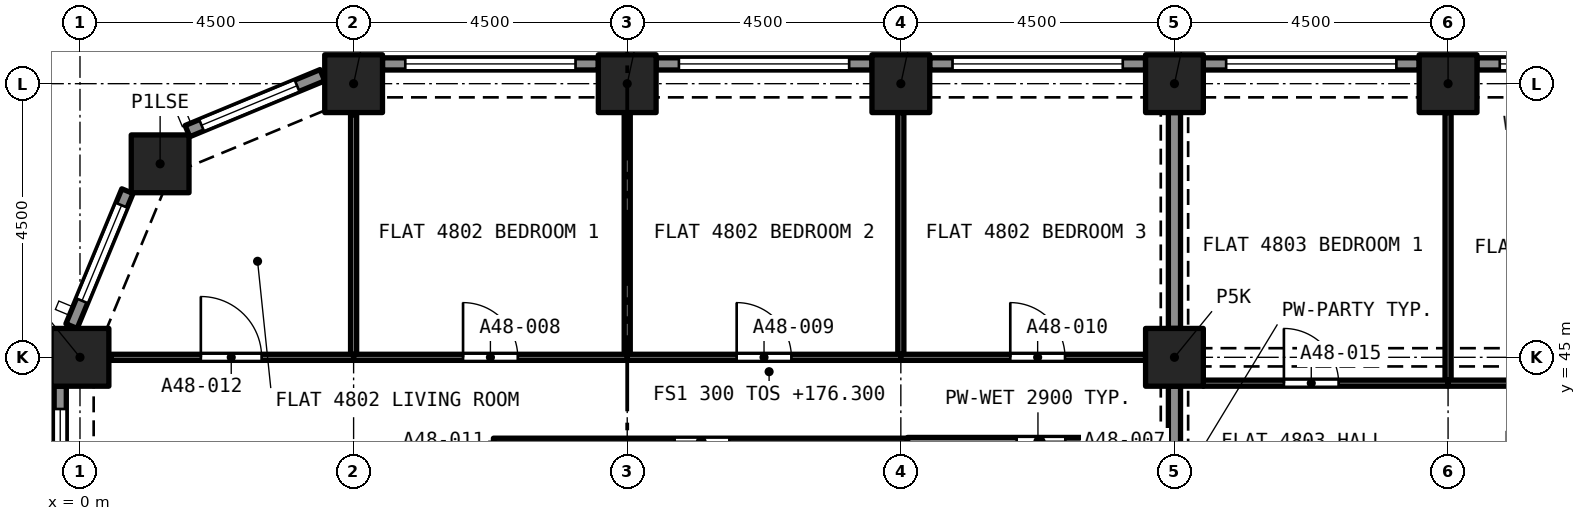
"""IFC4 building model, lengths in metres.
Left out: names, types, materials, properties, quantities, classifications, styles, units other than length and angle.
Written with IfcOpenShell. Run it as: python <this file> out.ifc"""

import sys

from ifc_helpers import new_model, si_unit, direction, frame, frame_2d, origin, origin_2d, place, context, subcontext, project, spatial, rectangle, extrude, element, fill, save


model = new_model("IFC4")
c1 = context("Model", 3, precision=1e-05, world=origin(), true_north=direction((0.0, 1.0)))
c2 = subcontext(c1, "Body", "Model", "MODEL_VIEW")
j1 = project(units=[si_unit("LENGTHUNIT", "METRE"), si_unit("PLANEANGLEUNIT", "RADIAN")], contexts=[c1])
p1 = place(None, origin())
s1 = spatial("IfcSite", under=j1, at=p1, CompositionType="ELEMENT")
p2 = place(p1, origin())
s2 = spatial("IfcBuilding", under=s1, at=p2, CompositionType="ELEMENT")
p3 = place(p2, frame((0.0, 0.0, 176.3)))
s3 = spatial("IfcBuildingStorey", under=s2, at=p3, CompositionType="ELEMENT", Elevation=176.3)
for number, where, z_axis, x_axis in (
    (1, (0.0, 45.0, 0.0), (0.0, 0.0, 1.0), (1.0, 0.0, 0.0)),
    (2, (18.0, 45.0, 0.0), (0.0, 0.0, 1.0), (1.0, 0.0, 0.0)),
    (3, (1.318, 48.182, 0.0), (0.0, 0.0, 1.0), (1.0, 0.0, 0.0)),
    (4, (4.5, 49.5, 0.0), (0.0, 0.0, 1.0), (1.0, 0.0, 0.0)),
    (5, (9.0, 49.5, 0.0), (0.0, 0.0, 1.0), (1.0, 0.0, 0.0)),
    (6, (13.5, 49.5, 0.0), (0.0, 0.0, 1.0), (1.0, 0.0, 0.0)),
    (7, (18.0, 49.5, 0.0), (0.0, 0.0, 1.0), (1.0, 0.0, 0.0)),
):
    element("IfcColumn", number, at=place(p3, frame(where, z_axis=z_axis, x_axis=x_axis)), inside=s3, PredefinedType="COLUMN", context=c2, shape_type="SweptSolid", body=[
        extrude(rectangle(XDim=0.95, YDim=0.95, at=origin_2d()), origin(), (0.0, 0.0, 1.0), 3.2),
    ])
p4 = place(p3, frame((22.5, 49.5, -0.45), z_axis=(0.0, 0.0, 1.0), x_axis=(1.0, 0.0, 0.0)))
e8 = element("IfcColumn", 8, at=p4, inside=s3, PredefinedType="COLUMN", context=c2, shape_type="SweptSolid", body=[
    extrude(rectangle(XDim=0.95, YDim=0.95, at=origin_2d()), origin(), (0.0, 0.0, 1.0), 3.65),
])
p5 = place(p3, frame((22.975, 49.825, 0.0), z_axis=(0.0, 0.0, 1.0), x_axis=(1.0, 0.0, 0.0)))
e9 = element("IfcWall", 9, at=p5, inside=s3, PredefinedType="SOLIDWALL", context=c2, shape_type="SweptSolid", body=[
    extrude(rectangle(XDim=3.55, YDim=0.2, at=frame_2d((1.775, 0.0))), origin(), (0.0, 0.0, 1.0), 3.2),
])
p6 = place(p5, frame((0.375, 0.0, 0.45)))
e10 = element("IfcOpeningElement", 10, at=p6, cuts=e9, PredefinedType="OPENING", context=c2, shape_type="SweptSolid", body=[
    extrude(rectangle(XDim=2.8, YDim=1.95, at=frame_2d((1.4, 0.975))), frame((0.0, 0.11, 0.0), z_axis=(0.0, -1.0, 0.0), x_axis=(1.0, 0.0, 0.0)), (0.0, 0.0, 1.0), 0.22),
])
p7 = place(p3, frame((18.475, 49.825, 0.0), z_axis=(0.0, 0.0, 1.0), x_axis=(1.0, 0.0, 0.0)))
e11 = element("IfcWall", 11, at=p7, inside=s3, PredefinedType="SOLIDWALL", context=c2, shape_type="SweptSolid", body=[
    extrude(rectangle(XDim=3.55, YDim=0.2, at=frame_2d((1.775, 0.0))), origin(), (0.0, 0.0, 1.0), 3.2),
])
p8 = place(p7, frame((0.375, 0.0, 0.45)))
e12 = element("IfcOpeningElement", 12, at=p8, cuts=e11, PredefinedType="OPENING", context=c2, shape_type="SweptSolid", body=[
    extrude(rectangle(XDim=2.8, YDim=1.95, at=frame_2d((1.4, 0.975))), frame((0.0, 0.11, 0.0), z_axis=(0.0, -1.0, 0.0), x_axis=(1.0, 0.0, 0.0)), (0.0, 0.0, 1.0), 0.22),
])
p9 = place(p3, frame((13.975, 49.825, 0.0), z_axis=(0.0, 0.0, 1.0), x_axis=(1.0, 0.0, 0.0)))
e13 = element("IfcWall", 13, at=p9, inside=s3, PredefinedType="SOLIDWALL", context=c2, shape_type="SweptSolid", body=[
    extrude(rectangle(XDim=3.55, YDim=0.2, at=frame_2d((1.775, 0.0))), origin(), (0.0, 0.0, 1.0), 3.2),
])
p10 = place(p9, frame((0.375, 0.0, 0.45)))
e14 = element("IfcOpeningElement", 14, at=p10, cuts=e13, PredefinedType="OPENING", context=c2, shape_type="SweptSolid", body=[
    extrude(rectangle(XDim=2.8, YDim=1.95, at=frame_2d((1.4, 0.975))), frame((0.0, 0.11, 0.0), z_axis=(0.0, -1.0, 0.0), x_axis=(1.0, 0.0, 0.0)), (0.0, 0.0, 1.0), 0.22),
])
p11 = place(p3, frame((9.475, 49.825, 0.0), z_axis=(0.0, 0.0, 1.0), x_axis=(1.0, 0.0, 0.0)))
e15 = element("IfcWall", 15, at=p11, inside=s3, PredefinedType="SOLIDWALL", context=c2, shape_type="SweptSolid", body=[
    extrude(rectangle(XDim=3.55, YDim=0.2, at=frame_2d((1.775, 0.0))), origin(), (0.0, 0.0, 1.0), 3.2),
])
p12 = place(p11, frame((0.375, 0.0, 0.45)))
e16 = element("IfcOpeningElement", 16, at=p12, cuts=e15, PredefinedType="OPENING", context=c2, shape_type="SweptSolid", body=[
    extrude(rectangle(XDim=2.8, YDim=1.95, at=frame_2d((1.4, 0.975))), frame((0.0, 0.11, 0.0), z_axis=(0.0, -1.0, 0.0), x_axis=(1.0, 0.0, 0.0)), (0.0, 0.0, 1.0), 0.22),
])
p13 = place(p3, frame((4.975, 49.825, 0.0), z_axis=(0.0, 0.0, 1.0), x_axis=(1.0, 0.0, 0.0)))
e17 = element("IfcWall", 17, at=p13, inside=s3, PredefinedType="SOLIDWALL", context=c2, shape_type="SweptSolid", body=[
    extrude(rectangle(XDim=3.55, YDim=0.2, at=frame_2d((1.775, 0.0))), origin(), (0.0, 0.0, 1.0), 3.2),
])
p14 = place(p13, frame((0.375, 0.0, 0.45)))
e18 = element("IfcOpeningElement", 18, at=p14, cuts=e17, PredefinedType="OPENING", context=c2, shape_type="SweptSolid", body=[
    extrude(rectangle(XDim=2.8, YDim=1.95, at=frame_2d((1.4, 0.975))), frame((0.0, 0.11, 0.0), z_axis=(0.0, -1.0, 0.0), x_axis=(1.0, 0.0, 0.0)), (0.0, 0.0, 1.0), 0.22),
])
p15 = place(p3, frame((1.767, 48.72, 0.0), z_axis=(0.0, 0.0, 1.0), x_axis=(0.923880599843, 0.382680855588, 0.0)))
e19 = element("IfcWall", 19, at=p15, inside=s3, PredefinedType="SOLIDWALL", context=c2, shape_type="SweptSolid", body=[
    extrude(rectangle(XDim=2.403, YDim=0.2, at=frame_2d((1.201, 0.0))), origin(), (0.0, 0.0, 1.0), 3.2),
])
p16 = place(p15, frame((0.251, 0.0, 0.45)))
e20 = element("IfcOpeningElement", 20, at=p16, cuts=e19, PredefinedType="OPENING", context=c2, shape_type="SweptSolid", body=[
    extrude(rectangle(XDim=1.7, YDim=1.95, at=frame_2d((0.85, 0.975))), frame((0.0, 0.11, 0.0), z_axis=(0.0, -1.0, 0.0), x_axis=(1.0, 0.0, 0.0)), (0.0, 0.0, 1.0), 0.22),
])
p17 = place(p3, frame((-0.139, 45.513, 0.0), z_axis=(0.0, 0.0, 1.0), x_axis=(0.382680855588, 0.923880599843, 0.0)))
e21 = element("IfcWall", 21, at=p17, inside=s3, PredefinedType="SOLIDWALL", context=c2, shape_type="SweptSolid", body=[
    extrude(rectangle(XDim=2.403, YDim=0.2, at=frame_2d((1.201, 0.0))), origin(), (0.0, 0.0, 1.0), 3.2),
])
p18 = place(p17, frame((0.451, 0.0, 0.45)))
e22 = element("IfcOpeningElement", 22, at=p18, cuts=e21, PredefinedType="OPENING", context=c2, shape_type="SweptSolid", body=[
    extrude(rectangle(XDim=1.7, YDim=1.95, at=frame_2d((0.85, 0.975))), frame((0.0, 0.11, 0.0), z_axis=(0.0, -1.0, 0.0), x_axis=(1.0, 0.0, 0.0)), (0.0, 0.0, 1.0), 0.22),
])
p19 = place(p3, frame((-0.325, 40.975, 0.0), z_axis=(0.0, 0.0, 1.0), x_axis=(0.0, 1.0, 0.0)))
e23 = element("IfcWall", 23, at=p19, inside=s3, PredefinedType="SOLIDWALL", context=c2, shape_type="SweptSolid", body=[
    extrude(rectangle(XDim=3.55, YDim=0.2, at=frame_2d((1.775, 0.0))), origin(), (0.0, 0.0, 1.0), 3.2),
])
p20 = place(p19, frame((0.375, 0.0, 0.45)))
e24 = element("IfcOpeningElement", 24, at=p20, cuts=e23, PredefinedType="OPENING", context=c2, shape_type="SweptSolid", body=[
    extrude(rectangle(XDim=2.8, YDim=1.95, at=frame_2d((1.4, 0.975))), frame((0.0, 0.11, 0.0), z_axis=(0.0, -1.0, 0.0), x_axis=(1.0, 0.0, 0.0)), (0.0, 0.0, 1.0), 0.22),
])
p21 = place(p3, frame((17.9, 43.62, 0.0), z_axis=(0.0, 0.0, 1.0), x_axis=(-1.0, 0.0, 0.0)))
e25 = element("IfcWall", 25, at=p21, inside=s3, PredefinedType="PARTITIONING", context=c2, shape_type="SweptSolid", body=[
    extrude(rectangle(XDim=4.29, YDim=0.125, at=frame_2d((2.145, 0.0))), origin(), (0.0, 0.0, 1.0), 2.9),
])
p22 = place(p21, frame((1.695, 0.0, 0.0)))
e26 = element("IfcOpeningElement", 26, at=p22, cuts=e25, PredefinedType="OPENING", context=c2, shape_type="SweptSolid", body=[
    extrude(rectangle(XDim=0.8, YDim=2.1, at=frame_2d((0.4, 1.05))), frame((0.0, 0.073, 0.0), z_axis=(0.0, -1.0, 0.0), x_axis=(1.0, 0.0, 0.0)), (0.0, 0.0, 1.0), 0.145),
])
p23 = place(p3, frame((18.0, 40.975, 0.0), z_axis=(0.0, 0.0, 1.0), x_axis=(0.0, 1.0, 0.0)))
e27 = element("IfcWall", 27, at=p23, inside=s3, PredefinedType="PARTITIONING", context=c2, shape_type="SweptSolid", body=[
    extrude(rectangle(XDim=3.55, YDim=0.2, at=frame_2d((1.775, 0.0))), origin(), (0.0, 0.0, 1.0), 2.38),
])
p24 = place(p3, frame((9.0, 45.05, 0.0), z_axis=(0.0, 0.0, 1.0), x_axis=(0.0, 1.0, 0.0)))
e28 = element("IfcWall", 28, at=p24, inside=s3, PredefinedType="PARTITIONING", context=c2, shape_type="SweptSolid", body=[
    extrude(rectangle(XDim=3.975, YDim=0.1, at=frame_2d((1.987, 0.0))), origin(), (0.0, 0.0, 1.0), 2.9),
])
p25 = place(p3, frame((4.5, 45.0, 0.0), z_axis=(0.0, 0.0, 1.0), x_axis=(1.0, 0.0, 0.0)))
e29 = element("IfcWall", 29, at=p25, inside=s3, PredefinedType="PARTITIONING", context=c2, shape_type="SweptSolid", body=[
    extrude(rectangle(XDim=4.5, YDim=0.1, at=frame_2d((2.25, 0.0))), origin(), (0.0, 0.0, 1.0), 2.9),
])
p26 = place(p25, frame((1.8, 0.0, 0.0)))
e30 = element("IfcOpeningElement", 30, at=p26, cuts=e29, PredefinedType="OPENING", context=c2, shape_type="SweptSolid", body=[
    extrude(rectangle(XDim=0.9, YDim=2.1, at=frame_2d((0.45, 1.05))), frame((0.0, 0.06, 0.0), z_axis=(0.0, -1.0, 0.0), x_axis=(1.0, 0.0, 0.0)), (0.0, 0.0, 1.0), 0.12),
])
p27 = place(p3, frame((4.5, 45.05, 0.0), z_axis=(0.0, 0.0, 1.0), x_axis=(0.0, 1.0, 0.0)))
e31 = element("IfcWall", 31, at=p27, inside=s3, PredefinedType="PARTITIONING", context=c2, shape_type="SweptSolid", body=[
    extrude(rectangle(XDim=3.936, YDim=0.1, at=frame_2d((1.968, 0.0))), origin(), (0.0, 0.0, 1.0), 2.9),
])
p28 = place(p3, frame((13.5, 45.05, 0.0), z_axis=(0.0, 0.0, 1.0), x_axis=(0.0, 1.0, 0.0)))
e32 = element("IfcWall", 32, at=p28, inside=s3, PredefinedType="PARTITIONING", context=c2, shape_type="SweptSolid", body=[
    extrude(rectangle(XDim=3.975, YDim=0.1, at=frame_2d((1.987, 0.0))), origin(), (0.0, 0.0, 1.0), 2.9),
])
p29 = place(p3, frame((9.0, 45.0, 0.0), z_axis=(0.0, 0.0, 1.0), x_axis=(1.0, 0.0, 0.0)))
e33 = element("IfcWall", 33, at=p29, inside=s3, PredefinedType="PARTITIONING", context=c2, shape_type="SweptSolid", body=[
    extrude(rectangle(XDim=4.5, YDim=0.1, at=frame_2d((2.25, 0.0))), origin(), (0.0, 0.0, 1.0), 2.9),
])
p30 = place(p29, frame((1.8, 0.0, 0.0)))
e34 = element("IfcOpeningElement", 34, at=p30, cuts=e33, PredefinedType="OPENING", context=c2, shape_type="SweptSolid", body=[
    extrude(rectangle(XDim=0.9, YDim=2.1, at=frame_2d((0.45, 1.05))), frame((0.0, 0.06, 0.0), z_axis=(0.0, -1.0, 0.0), x_axis=(1.0, 0.0, 0.0)), (0.0, 0.0, 1.0), 0.12),
])
p31 = place(p3, frame((13.5, 45.0, 0.0), z_axis=(0.0, 0.0, 1.0), x_axis=(1.0, 0.0, 0.0)))
e35 = element("IfcWall", 35, at=p31, inside=s3, PredefinedType="PARTITIONING", context=c2, shape_type="SweptSolid", body=[
    extrude(rectangle(XDim=4.025, YDim=0.1, at=frame_2d((2.012, 0.0))), origin(), (0.0, 0.0, 1.0), 2.9),
])
p32 = place(p31, frame((1.8, 0.0, 0.0)))
e36 = element("IfcOpeningElement", 36, at=p32, cuts=e35, PredefinedType="OPENING", context=c2, shape_type="SweptSolid", body=[
    extrude(rectangle(XDim=0.9, YDim=2.1, at=frame_2d((0.45, 1.05))), frame((0.0, 0.06, 0.0), z_axis=(0.0, -1.0, 0.0), x_axis=(1.0, 0.0, 0.0)), (0.0, 0.0, 1.0), 0.12),
])
p33 = place(p3, frame((18.0, 45.475, 0.0), z_axis=(0.0, 0.0, 1.0), x_axis=(0.0, 1.0, 0.0)))
e37 = element("IfcWall", 37, at=p33, inside=s3, PredefinedType="PARTITIONING", context=c2, shape_type="SweptSolid", body=[
    extrude(rectangle(XDim=3.55, YDim=0.2, at=frame_2d((1.775, 0.0))), origin(), (0.0, 0.0, 1.0), 2.38),
])
p34 = place(p3, frame((13.61, 43.62, 0.0), z_axis=(0.0, 0.0, 1.0), x_axis=(-1.0, 0.0, 0.0)))
e38 = element("IfcWall", 38, at=p34, inside=s3, PredefinedType="PARTITIONING", context=c2, shape_type="SweptSolid", body=[
    extrude(rectangle(XDim=6.81, YDim=0.1, at=frame_2d((3.405, 0.0))), origin(), (0.0, 0.0, 1.0), 2.9),
])
p35 = place(p34, frame((2.93, 0.0, 0.0)))
e39 = element("IfcOpeningElement", 39, at=p35, cuts=e38, PredefinedType="OPENING", context=c2, shape_type="SweptSolid", body=[
    extrude(rectangle(XDim=0.9, YDim=2.1, at=frame_2d((0.45, 1.05))), frame((0.0, 0.06, 0.0), z_axis=(0.0, -1.0, 0.0), x_axis=(1.0, 0.0, 0.0)), (0.0, 0.0, 1.0), 0.12),
])
p36 = place(p3, frame((0.514, 45.0, 0.0), z_axis=(0.0, 0.0, 1.0), x_axis=(1.0, 0.0, 0.0)))
e40 = element("IfcWall", 40, at=p36, inside=s3, PredefinedType="PARTITIONING", context=c2, shape_type="SweptSolid", body=[
    extrude(rectangle(XDim=3.986, YDim=0.1, at=frame_2d((1.993, 0.0))), origin(), (0.0, 0.0, 1.0), 2.9),
])
p37 = place(p36, frame((1.473, 0.0, 0.0)))
e41 = element("IfcOpeningElement", 41, at=p37, cuts=e40, PredefinedType="OPENING", context=c2, shape_type="SweptSolid", body=[
    extrude(rectangle(XDim=1.0, YDim=2.1, at=frame_2d((0.5, 1.05))), frame((0.0, 0.06, 0.0), z_axis=(0.0, -1.0, 0.0), x_axis=(1.0, 0.0, 0.0)), (0.0, 0.0, 1.0), 0.12),
])
p38 = place(p3, frame((22.5, 44.625, 0.0), z_axis=(0.0, 0.0, 1.0), x_axis=(0.0, 1.0, 0.0)))
e42 = element("IfcWall", 42, at=p38, inside=s3, PredefinedType="PARTITIONING", context=c2, shape_type="SweptSolid", body=[
    extrude(rectangle(XDim=4.4, YDim=0.1, at=frame_2d((2.2, 0.0))), origin(), (0.0, 0.0, 1.0), 2.75),
])
p39 = place(p3, frame((18.475, 44.575, 0.0), z_axis=(0.0, 0.0, 1.0), x_axis=(1.0, 0.0, 0.0)))
e43 = element("IfcWall", 43, at=p39, inside=s3, PredefinedType="PARTITIONING", context=c2, shape_type="SweptSolid", body=[
    extrude(rectangle(XDim=4.025, YDim=0.1, at=frame_2d((2.012, 0.0))), origin(), (0.0, 0.0, 1.0), 2.75),
])
p40 = place(p39, frame((1.325, 0.0, 0.0)))
e44 = element("IfcOpeningElement", 44, at=p40, cuts=e43, PredefinedType="OPENING", context=c2, shape_type="SweptSolid", body=[
    extrude(rectangle(XDim=0.9, YDim=2.1, at=frame_2d((0.45, 1.05))), frame((0.0, 0.06, 0.0), z_axis=(0.0, -1.0, 0.0), x_axis=(1.0, 0.0, 0.0)), (0.0, 0.0, 1.0), 0.12),
])
p41 = place(p3, frame((22.5, 44.575, 0.0), z_axis=(0.0, 0.0, 1.0), x_axis=(1.0, 0.0, 0.0)))
e45 = element("IfcWall", 45, at=p41, inside=s3, PredefinedType="PARTITIONING", context=c2, shape_type="SweptSolid", body=[
    extrude(rectangle(XDim=4.45, YDim=0.1, at=frame_2d((2.225, 0.0))), origin(), (0.0, 0.0, 1.0), 2.75),
])
p42 = place(p41, frame((1.8, 0.0, 0.0)))
e46 = element("IfcOpeningElement", 46, at=p42, cuts=e45, PredefinedType="OPENING", context=c2, shape_type="SweptSolid", body=[
    extrude(rectangle(XDim=0.9, YDim=2.1, at=frame_2d((0.45, 1.05))), frame((0.0, 0.06, 0.0), z_axis=(0.0, -1.0, 0.0), x_axis=(1.0, 0.0, 0.0)), (0.0, 0.0, 1.0), 0.12),
])
p43 = place(p6, origin())
e47 = element("IfcWindow", 47, at=p43, inside=s3, PartitioningType="SINGLE_PANEL", PredefinedType="WINDOW", context=c2, shape_type="SweptSolid", body=[
    extrude(rectangle(XDim=2.8, YDim=1.95, at=frame_2d((1.4, 0.975))), frame((0.0, 0.03, 0.0), z_axis=(0.0, -1.0, 0.0), x_axis=(1.0, 0.0, 0.0)), (0.0, 0.0, 1.0), 0.06),
])
fill(e10, e47)
p44 = place(p8, origin())
e48 = element("IfcWindow", 48, at=p44, inside=s3, PartitioningType="SINGLE_PANEL", PredefinedType="WINDOW", context=c2, shape_type="SweptSolid", body=[
    extrude(rectangle(XDim=2.8, YDim=1.95, at=frame_2d((1.4, 0.975))), frame((0.0, 0.03, 0.0), z_axis=(0.0, -1.0, 0.0), x_axis=(1.0, 0.0, 0.0)), (0.0, 0.0, 1.0), 0.06),
])
fill(e12, e48)
p45 = place(p10, origin())
e49 = element("IfcWindow", 49, at=p45, inside=s3, PartitioningType="SINGLE_PANEL", PredefinedType="WINDOW", context=c2, shape_type="SweptSolid", body=[
    extrude(rectangle(XDim=2.8, YDim=1.95, at=frame_2d((1.4, 0.975))), frame((0.0, 0.03, 0.0), z_axis=(0.0, -1.0, 0.0), x_axis=(1.0, 0.0, 0.0)), (0.0, 0.0, 1.0), 0.06),
])
fill(e14, e49)
p46 = place(p12, origin())
e50 = element("IfcWindow", 50, at=p46, inside=s3, PartitioningType="SINGLE_PANEL", PredefinedType="WINDOW", context=c2, shape_type="SweptSolid", body=[
    extrude(rectangle(XDim=2.8, YDim=1.95, at=frame_2d((1.4, 0.975))), frame((0.0, 0.03, 0.0), z_axis=(0.0, -1.0, 0.0), x_axis=(1.0, 0.0, 0.0)), (0.0, 0.0, 1.0), 0.06),
])
fill(e16, e50)
p47 = place(p14, origin())
e51 = element("IfcWindow", 51, at=p47, inside=s3, PartitioningType="SINGLE_PANEL", PredefinedType="WINDOW", context=c2, shape_type="SweptSolid", body=[
    extrude(rectangle(XDim=2.8, YDim=1.95, at=frame_2d((1.4, 0.975))), frame((0.0, 0.03, 0.0), z_axis=(0.0, -1.0, 0.0), x_axis=(1.0, 0.0, 0.0)), (0.0, 0.0, 1.0), 0.06),
])
fill(e18, e51)
p48 = place(p16, origin())
e52 = element("IfcWindow", 52, at=p48, inside=s3, PartitioningType="SINGLE_PANEL", PredefinedType="WINDOW", context=c2, shape_type="SweptSolid", body=[
    extrude(rectangle(XDim=1.7, YDim=1.95, at=frame_2d((0.85, 0.975))), frame((0.0, 0.03, 0.0), z_axis=(0.0, -1.0, 0.0), x_axis=(1.0, 0.0, 0.0)), (0.0, 0.0, 1.0), 0.06),
])
fill(e20, e52)
p49 = place(p18, origin())
e53 = element("IfcWindow", 53, at=p49, inside=s3, PartitioningType="SINGLE_PANEL", PredefinedType="WINDOW", context=c2, shape_type="SweptSolid", body=[
    extrude(rectangle(XDim=1.7, YDim=1.95, at=frame_2d((0.85, 0.975))), frame((0.0, 0.03, 0.0), z_axis=(0.0, -1.0, 0.0), x_axis=(1.0, 0.0, 0.0)), (0.0, 0.0, 1.0), 0.06),
])
fill(e22, e53)
p50 = place(p20, origin())
e54 = element("IfcWindow", 54, at=p50, inside=s3, PartitioningType="SINGLE_PANEL", PredefinedType="WINDOW", context=c2, shape_type="SweptSolid", body=[
    extrude(rectangle(XDim=2.8, YDim=1.95, at=frame_2d((1.4, 0.975))), frame((0.0, 0.03, 0.0), z_axis=(0.0, -1.0, 0.0), x_axis=(1.0, 0.0, 0.0)), (0.0, 0.0, 1.0), 0.06),
])
fill(e24, e54)
p51 = place(p22, origin())
e55 = element("IfcDoor", 55, at=p51, inside=s3, OperationType="SINGLE_SWING_LEFT", PredefinedType="DOOR", context=c2, shape_type="SweptSolid", body=[
    extrude(rectangle(XDim=0.8, YDim=2.1, at=frame_2d((0.4, 1.05))), frame((0.0, 0.025, 0.0), z_axis=(0.0, -1.0, 0.0), x_axis=(1.0, 0.0, 0.0)), (0.0, 0.0, 1.0), 0.05),
])
fill(e26, e55)
p52 = place(p26, origin())
e56 = element("IfcDoor", 56, at=p52, inside=s3, OperationType="SINGLE_SWING_LEFT", PredefinedType="DOOR", context=c2, shape_type="SweptSolid", body=[
    extrude(rectangle(XDim=0.9, YDim=2.1, at=frame_2d((0.45, 1.05))), frame((0.0, 0.025, 0.0), z_axis=(0.0, -1.0, 0.0), x_axis=(1.0, 0.0, 0.0)), (0.0, 0.0, 1.0), 0.05),
])
fill(e30, e56)
p53 = place(p30, origin())
e57 = element("IfcDoor", 57, at=p53, inside=s3, OperationType="SINGLE_SWING_LEFT", PredefinedType="DOOR", context=c2, shape_type="SweptSolid", body=[
    extrude(rectangle(XDim=0.9, YDim=2.1, at=frame_2d((0.45, 1.05))), frame((0.0, 0.025, 0.0), z_axis=(0.0, -1.0, 0.0), x_axis=(1.0, 0.0, 0.0)), (0.0, 0.0, 1.0), 0.05),
])
fill(e34, e57)
p54 = place(p32, origin())
e58 = element("IfcDoor", 58, at=p54, inside=s3, OperationType="SINGLE_SWING_RIGHT", PredefinedType="DOOR", context=c2, shape_type="SweptSolid", body=[
    extrude(rectangle(XDim=0.9, YDim=2.1, at=frame_2d((0.45, 1.05))), frame((0.0, 0.025, 0.0), z_axis=(0.0, -1.0, 0.0), x_axis=(1.0, 0.0, 0.0)), (0.0, 0.0, 1.0), 0.05),
])
fill(e36, e58)
p55 = place(p35, origin())
e59 = element("IfcDoor", 59, at=p55, inside=s3, OperationType="SINGLE_SWING_LEFT", PredefinedType="DOOR", context=c2, shape_type="SweptSolid", body=[
    extrude(rectangle(XDim=0.9, YDim=2.1, at=frame_2d((0.45, 1.05))), frame((0.0, 0.025, 0.0), z_axis=(0.0, -1.0, 0.0), x_axis=(1.0, 0.0, 0.0)), (0.0, 0.0, 1.0), 0.05),
])
fill(e39, e59)
p56 = place(p37, origin())
e60 = element("IfcDoor", 60, at=p56, inside=s3, OperationType="SINGLE_SWING_LEFT", PredefinedType="DOOR", context=c2, shape_type="SweptSolid", body=[
    extrude(rectangle(XDim=1.0, YDim=2.1, at=frame_2d((0.5, 1.05))), frame((0.0, 0.025, 0.0), z_axis=(0.0, -1.0, 0.0), x_axis=(1.0, 0.0, 0.0)), (0.0, 0.0, 1.0), 0.05),
])
fill(e41, e60)
p57 = place(p40, origin())
e61 = element("IfcDoor", 61, at=p57, inside=s3, OperationType="SINGLE_SWING_LEFT", PredefinedType="DOOR", context=c2, shape_type="SweptSolid", body=[
    extrude(rectangle(XDim=0.9, YDim=2.1, at=frame_2d((0.45, 1.05))), frame((0.0, 0.025, 0.0), z_axis=(0.0, -1.0, 0.0), x_axis=(1.0, 0.0, 0.0)), (0.0, 0.0, 1.0), 0.05),
])
fill(e44, e61)
save(model, sys.argv[1])
